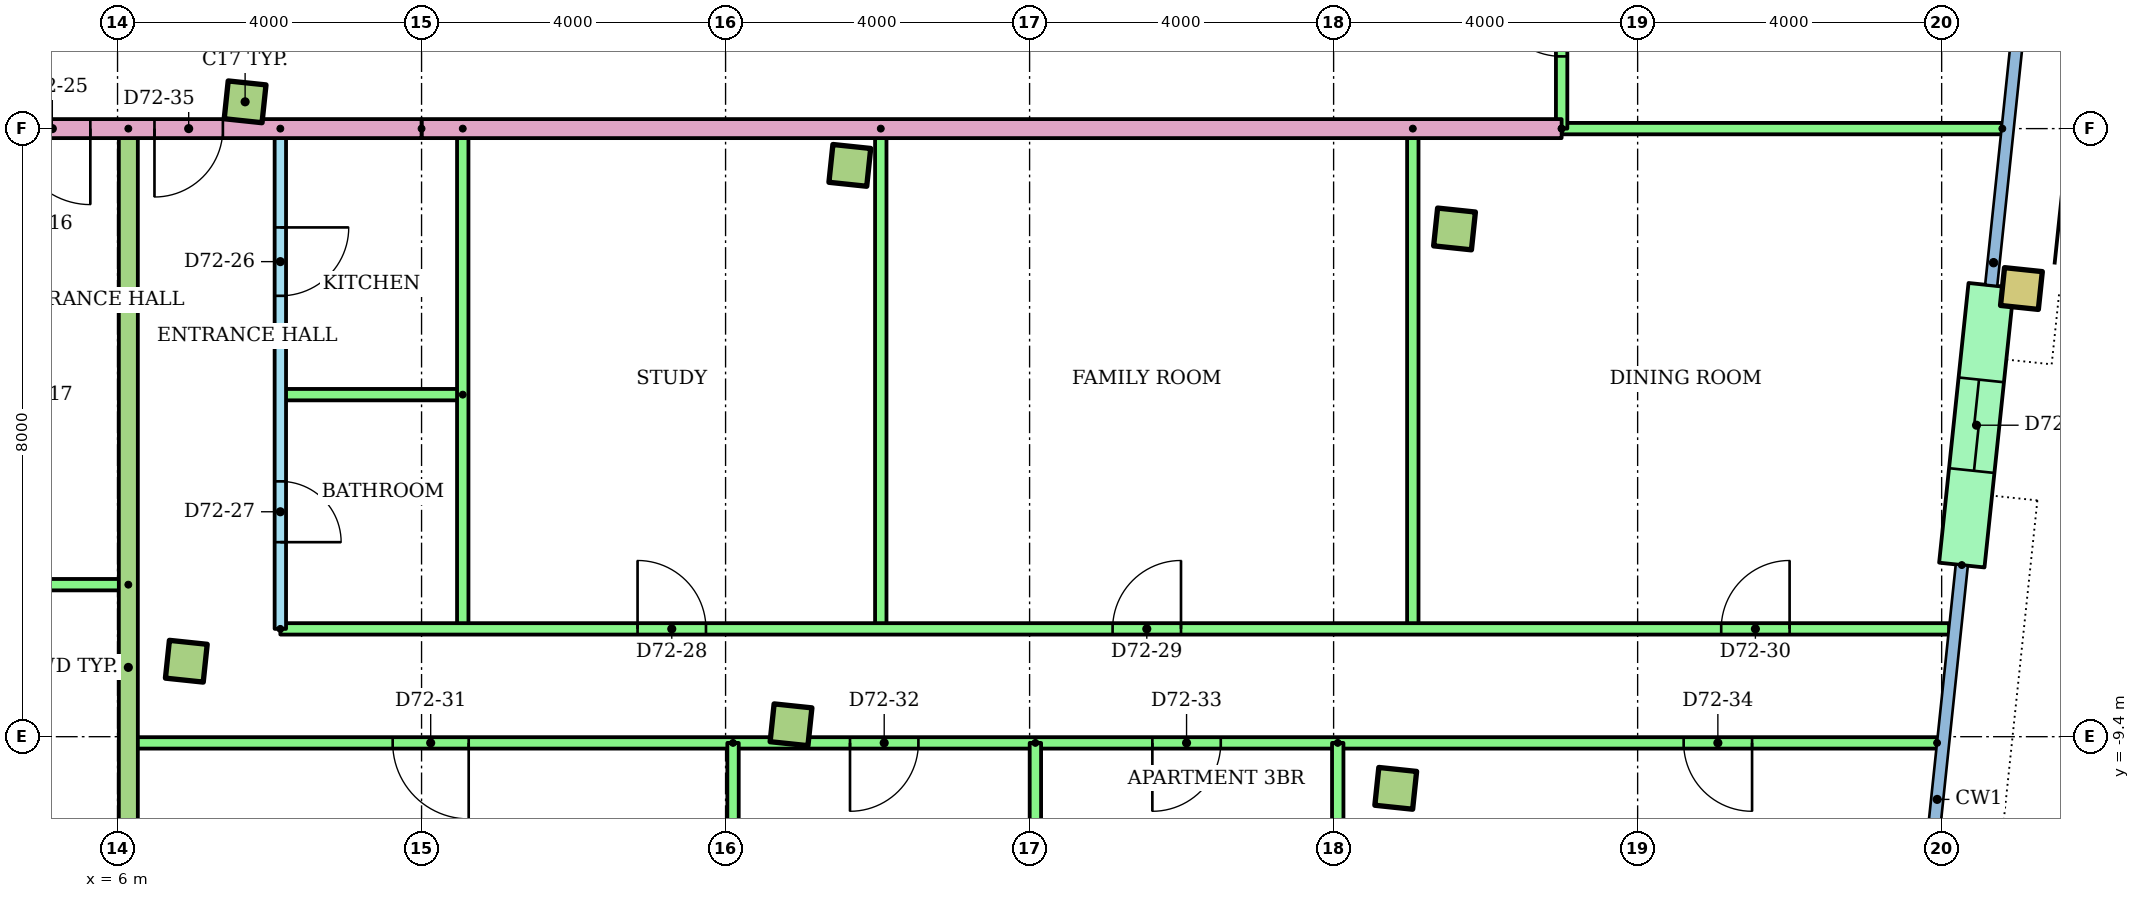
"""IFC4 building model, lengths in metres.
Left out: names, types, materials, properties, quantities, classifications, styles, units other than length and angle.
Written with IfcOpenShell. Run it as: python <this file> out.ifc"""

import sys

from ifc_helpers import new_model, si_unit, direction, frame, frame_2d, origin, origin_2d, place, context, subcontext, project, spatial, rectangle, hollow_rectangle, extrude, element, fill, save


model = new_model("IFC4")
c1 = context("Model", 3, precision=1e-05, world=origin(), true_north=direction((0.0, 1.0)))
c2 = subcontext(c1, "Body", "Model", "MODEL_VIEW")
j1 = project(units=[si_unit("LENGTHUNIT", "METRE"), si_unit("PLANEANGLEUNIT", "RADIAN")], contexts=[c1])
p1 = place(None, origin())
s1 = spatial("IfcSite", under=j1, at=p1, CompositionType="ELEMENT")
p2 = place(p1, origin())
s2 = spatial("IfcBuilding", under=s1, at=p2, CompositionType="ELEMENT")
p3 = place(p2, frame((0.0, 0.0, 275.5)))
s3 = spatial("IfcBuildingStorey", under=s2, at=p3, CompositionType="ELEMENT", Elevation=275.5)
for number, where, z_axis, x_axis in (
    (1, (6.905, -8.407, 0.0), (0.0, 0.0, 1.0), (0.995, -0.105, 0.0)),
    (2, (14.861, -9.243, 0.0), (0.0, 0.0, 1.0), (0.995, -0.105, 0.0)),
    (3, (22.817, -10.08, 0.0), (0.0, 0.0, 1.0), (0.995, -0.105, 0.0)),
    (4, (7.678, -1.048, 0.0), (0.0, 0.0, 1.0), (0.995, -0.105, 0.0)),
    (5, (15.635, -1.884, 0.0), (0.0, 0.0, 1.0), (0.995, -0.105, 0.0)),
    (6, (23.591, -2.72, 0.0), (0.0, 0.0, 1.0), (0.995, -0.105, 0.0)),
):
    element("IfcColumn", number, at=place(p3, frame(where, z_axis=z_axis, x_axis=x_axis)), inside=s3, PredefinedType="COLUMN", context=c2, shape_type="SweptSolid", body=[
        extrude(rectangle(XDim=0.5, YDim=0.5, at=origin_2d()), origin(), (0.0, 0.0, 1.0), 3.2),
    ])
p4 = place(p3, frame((31.05, -3.504, 0.0), z_axis=(0.0, 0.0, 1.0), x_axis=(0.994521895368, -0.104528463268, 0.0)))
e7 = element("IfcColumn", 7, at=p4, inside=s3, PredefinedType="COLUMN", context=c2, shape_type="SweptSolid", body=[
    extrude(hollow_rectangle(XDim=0.5, YDim=0.5, WallThickness=0.025, at=origin_2d()), origin(), (0.0, 0.0, 1.0), 3.2),
])
p5 = place(p3, frame((30.265, -7.142, 0.0), z_axis=(0.0, 0.0, 1.0), x_axis=(0.104513052986, 0.994523514933, 0.0)))
e8 = element("IfcWall", 8, at=p5, inside=s3, PredefinedType="STANDARD", context=c2, shape_type="SweptSolid", body=[
    extrude(rectangle(XDim=3.7, YDim=0.6, at=frame_2d((1.85, 0.0))), origin(), (0.0, 0.0, 1.0), 2.92),
])
p6 = place(p5, frame((1.25, 0.0, 0.0)))
e9 = element("IfcOpeningElement", 9, at=p6, cuts=e8, PredefinedType="OPENING", context=c2, shape_type="SweptSolid", body=[
    extrude(rectangle(XDim=1.2, YDim=2.1, at=frame_2d((0.6, 1.05))), frame((0.0, 0.31, 0.0), z_axis=(0.0, -1.0, 0.0), x_axis=(1.0, 0.0, 0.0)), (0.0, 0.0, 1.0), 0.62),
])
p7 = place(p3, frame((6.142, -7.4, 0.0), z_axis=(0.0, 0.0, 1.0), x_axis=(-1.0, 0.0, 0.0)))
e10 = element("IfcWall", 10, at=p7, inside=s3, PredefinedType="PARTITIONING", context=c2, shape_type="SweptSolid", body=[
    extrude(rectangle(XDim=15.912, YDim=0.15, at=frame_2d((7.956, 0.0))), origin(), (0.0, 0.0, 1.0), 2.4),
])
p8 = place(p7, frame((12.252, 0.0, 0.0)))
e11 = element("IfcOpeningElement", 11, at=p8, cuts=e10, PredefinedType="OPENING", context=c2, shape_type="SweptSolid", body=[
    extrude(rectangle(XDim=0.9, YDim=2.1, at=frame_2d((0.45, 1.05))), frame((0.0, 0.085, 0.0), z_axis=(0.0, -1.0, 0.0), x_axis=(1.0, 0.0, 0.0)), (0.0, 0.0, 1.0), 0.17),
])
p9 = place(p7, frame((9.495, 0.0, 0.0)))
e12 = element("IfcOpeningElement", 12, at=p9, cuts=e10, PredefinedType="OPENING", context=c2, shape_type="SweptSolid", body=[
    extrude(rectangle(XDim=0.9, YDim=2.1, at=frame_2d((0.45, 1.05))), frame((0.0, 0.085, 0.0), z_axis=(0.0, -1.0, 0.0), x_axis=(1.0, 0.0, 0.0)), (0.0, 0.0, 1.0), 0.17),
])
p10 = place(p7, frame((3.478, 0.0, 0.0)))
e13 = element("IfcOpeningElement", 13, at=p10, cuts=e10, PredefinedType="OPENING", context=c2, shape_type="SweptSolid", body=[
    extrude(rectangle(XDim=1.0, YDim=2.1, at=frame_2d((0.5, 1.05))), frame((0.0, 0.085, 0.0), z_axis=(0.0, -1.0, 0.0), x_axis=(1.0, 0.0, 0.0)), (0.0, 0.0, 1.0), 0.17),
])
p11 = place(p3, frame((8.142, -1.4, 0.0), z_axis=(0.0, 0.0, 1.0), x_axis=(0.0, -1.0, 0.0)))
e14 = element("IfcWall", 14, at=p11, inside=s3, PredefinedType="PARTITIONING", context=c2, shape_type="SweptSolid", body=[
    extrude(rectangle(XDim=6.582, YDim=0.15, at=frame_2d((3.291, 0.0))), origin(), (0.0, 0.0, 1.0), 2.4),
])
p12 = place(p11, frame((1.3, 0.0, 0.0)))
e15 = element("IfcOpeningElement", 15, at=p12, cuts=e14, PredefinedType="OPENING", context=c2, shape_type="SweptSolid", body=[
    extrude(rectangle(XDim=0.9, YDim=2.1, at=frame_2d((0.45, 1.05))), frame((0.0, 0.085, 0.0), z_axis=(0.0, -1.0, 0.0), x_axis=(1.0, 0.0, 0.0)), (0.0, 0.0, 1.0), 0.17),
])
p13 = place(p11, frame((4.641, 0.0, 0.0)))
e16 = element("IfcOpeningElement", 16, at=p13, cuts=e14, PredefinedType="OPENING", context=c2, shape_type="SweptSolid", body=[
    extrude(rectangle(XDim=0.8, YDim=2.1, at=frame_2d((0.4, 1.05))), frame((0.0, 0.085, 0.0), z_axis=(0.0, -1.0, 0.0), x_axis=(1.0, 0.0, 0.0)), (0.0, 0.0, 1.0), 0.17),
])
p14 = place(p3, frame((10.542, -4.9, 0.0), z_axis=(0.0, 0.0, 1.0), x_axis=(-1.0, 0.0, 0.0)))
e17 = element("IfcWall", 17, at=p14, inside=s3, PredefinedType="PARTITIONING", context=c2, shape_type="SweptSolid", body=[
    extrude(rectangle(XDim=2.4, YDim=0.15, at=frame_2d((1.2, 0.0))), origin(), (0.0, 0.0, 1.0), 2.4),
])
for number, where, z_axis, x_axis in (
    (18, (10.542, -1.4, 0.0), (0.0, 0.0, 1.0), (0.0, -1.0, 0.0)),
    (19, (16.042, -1.4, 0.0), (0.0, 0.0, 1.0), (0.0, -1.0, 0.0)),
    (20, (23.042, -1.4, 0.0), (0.0, 0.0, 1.0), (0.0, -1.0, 0.0)),
):
    element("IfcWall", number, at=place(p3, frame(where, z_axis=z_axis, x_axis=x_axis)), inside=s3, PredefinedType="PARTITIONING", context=c2, shape_type="SweptSolid", body=[
        extrude(rectangle(XDim=6.582, YDim=0.15, at=frame_2d((3.291, 0.0))), origin(), (0.0, 0.0, 1.0), 2.4),
    ])
p15 = place(p3, frame((8.142, -7.982, 0.0)))
e21 = element("IfcWall", 21, at=p15, inside=s3, PredefinedType="PARTITIONING", context=c2, shape_type="SweptSolid", body=[
    extrude(rectangle(XDim=21.955, YDim=0.15, at=frame_2d((10.978, 0.0))), origin(), (0.0, 0.0, 1.0), 2.4),
])
p16 = place(p15, frame((4.7, 0.0, 0.0)))
e22 = element("IfcOpeningElement", 22, at=p16, cuts=e21, PredefinedType="OPENING", context=c2, shape_type="SweptSolid", body=[
    extrude(rectangle(XDim=0.9, YDim=2.1, at=frame_2d((0.45, 1.05))), frame((0.0, 0.085, 0.0), z_axis=(0.0, -1.0, 0.0), x_axis=(1.0, 0.0, 0.0)), (0.0, 0.0, 1.0), 0.17),
])
p17 = place(p15, frame((10.95, 0.0, 0.0)))
e23 = element("IfcOpeningElement", 23, at=p17, cuts=e21, PredefinedType="OPENING", context=c2, shape_type="SweptSolid", body=[
    extrude(rectangle(XDim=0.9, YDim=2.1, at=frame_2d((0.45, 1.05))), frame((0.0, 0.085, 0.0), z_axis=(0.0, -1.0, 0.0), x_axis=(1.0, 0.0, 0.0)), (0.0, 0.0, 1.0), 0.17),
])
p18 = place(p15, frame((18.958, 0.0, 0.0)))
e24 = element("IfcOpeningElement", 24, at=p18, cuts=e21, PredefinedType="OPENING", context=c2, shape_type="SweptSolid", body=[
    extrude(rectangle(XDim=0.9, YDim=2.1, at=frame_2d((0.45, 1.05))), frame((0.0, 0.085, 0.0), z_axis=(0.0, -1.0, 0.0), x_axis=(1.0, 0.0, 0.0)), (0.0, 0.0, 1.0), 0.17),
])
p19 = place(p3, frame((29.94, -9.482, 0.0), z_axis=(0.0, 0.0, 1.0), x_axis=(-1.0, 0.0, 0.0)))
e25 = element("IfcWall", 25, at=p19, inside=s3, PredefinedType="PARTITIONING", context=c2, shape_type="SweptSolid", body=[
    extrude(rectangle(XDim=23.798, YDim=0.15, at=frame_2d((11.899, 0.0))), origin(), (0.0, 0.0, 1.0), 2.4),
])
p20 = place(p19, frame((19.32, 0.0, 0.0)))
e26 = element("IfcOpeningElement", 26, at=p20, cuts=e25, PredefinedType="OPENING", context=c2, shape_type="SweptSolid", body=[
    extrude(rectangle(XDim=1.0, YDim=2.1, at=frame_2d((0.5, 1.05))), frame((0.0, 0.085, 0.0), z_axis=(0.0, -1.0, 0.0), x_axis=(1.0, 0.0, 0.0)), (0.0, 0.0, 1.0), 0.17),
])
p21 = place(p19, frame((13.403, 0.0, 0.0)))
e27 = element("IfcOpeningElement", 27, at=p21, cuts=e25, PredefinedType="OPENING", context=c2, shape_type="SweptSolid", body=[
    extrude(rectangle(XDim=0.9, YDim=2.1, at=frame_2d((0.45, 1.05))), frame((0.0, 0.085, 0.0), z_axis=(0.0, -1.0, 0.0), x_axis=(1.0, 0.0, 0.0)), (0.0, 0.0, 1.0), 0.17),
])
p22 = place(p19, frame((9.425, 0.0, 0.0)))
e28 = element("IfcOpeningElement", 28, at=p22, cuts=e25, PredefinedType="OPENING", context=c2, shape_type="SweptSolid", body=[
    extrude(rectangle(XDim=0.9, YDim=2.1, at=frame_2d((0.45, 1.05))), frame((0.0, 0.085, 0.0), z_axis=(0.0, -1.0, 0.0), x_axis=(1.0, 0.0, 0.0)), (0.0, 0.0, 1.0), 0.17),
])
p23 = place(p19, frame((2.434, 0.0, 0.0)))
e29 = element("IfcOpeningElement", 29, at=p23, cuts=e25, PredefinedType="OPENING", context=c2, shape_type="SweptSolid", body=[
    extrude(rectangle(XDim=0.9, YDim=2.1, at=frame_2d((0.45, 1.05))), frame((0.0, 0.085, 0.0), z_axis=(0.0, -1.0, 0.0), x_axis=(1.0, 0.0, 0.0)), (0.0, 0.0, 1.0), 0.17),
])
p24 = place(p3, frame((14.098, -9.482, 0.0), z_axis=(0.0, 0.0, 1.0), x_axis=(0.0, -1.0, 0.0)))
e30 = element("IfcWall", 30, at=p24, inside=s3, PredefinedType="PARTITIONING", context=c2, shape_type="SweptSolid", body=[
    extrude(rectangle(XDim=6.931, YDim=0.15, at=frame_2d((3.466, 0.0))), origin(), (0.0, 0.0, 1.0), 2.4),
])
p25 = place(p3, frame((18.076, -9.482, 0.0), z_axis=(0.0, 0.0, 1.0), x_axis=(0.0, -1.0, 0.0)))
e31 = element("IfcWall", 31, at=p25, inside=s3, PredefinedType="PARTITIONING", context=c2, shape_type="SweptSolid", body=[
    extrude(rectangle(XDim=7.36, YDim=0.15, at=frame_2d((3.68, 0.0))), origin(), (0.0, 0.0, 1.0), 2.4),
])
p26 = place(p3, frame((22.054, -9.482, 0.0), z_axis=(0.0, 0.0, 1.0), x_axis=(0.0, -1.0, 0.0)))
e32 = element("IfcWall", 32, at=p26, inside=s3, PredefinedType="PARTITIONING", context=c2, shape_type="SweptSolid", body=[
    extrude(rectangle(XDim=7.767, YDim=0.15, at=frame_2d((3.884, 0.0))), origin(), (0.0, 0.0, 1.0), 2.4),
])
p27 = place(p3, frame((6.142, -1.4, 0.0), z_axis=(0.0, 0.0, 1.0), x_axis=(0.0, -1.0, 0.0)))
e33 = element("IfcWall", 33, at=p27, inside=s3, PredefinedType="PARTITIONING", context=c2, shape_type="SweptSolid", body=[
    extrude(rectangle(XDim=14.177, YDim=0.25, at=frame_2d((7.088, 0.0))), origin(), (0.0, 0.0, 1.0), 2.4),
])
p28 = place(p3, frame((25.0, -1.4, 0.0), z_axis=(0.0, 0.0, 1.0), x_axis=(-1.0, 0.0, 0.0)))
e34 = element("IfcWall", 34, at=p28, inside=s3, PredefinedType="PARTITIONING", context=c2, shape_type="SweptSolid", body=[
    extrude(rectangle(XDim=15.0, YDim=0.25, at=frame_2d((7.5, 0.0))), origin(), (0.0, 0.0, 1.0), 2.4),
])
p29 = place(p3, frame((30.798, -1.4, 0.0), z_axis=(0.0, 0.0, 1.0), x_axis=(-1.0, 0.0, 0.0)))
e35 = element("IfcWall", 35, at=p29, inside=s3, PredefinedType="PARTITIONING", context=c2, shape_type="SweptSolid", body=[
    extrude(rectangle(XDim=5.798, YDim=0.15, at=frame_2d((2.899, 0.0))), origin(), (0.0, 0.0, 1.0), 2.4),
])
p30 = place(p3, frame((25.0, -1.4, 0.0), z_axis=(0.0, 0.0, 1.0), x_axis=(0.0, 1.0, 0.0)))
e36 = element("IfcWall", 36, at=p30, inside=s3, PredefinedType="PARTITIONING", context=c2, shape_type="SweptSolid", body=[
    extrude(rectangle(XDim=2.8, YDim=0.15, at=frame_2d((1.4, 0.0))), origin(), (0.0, 0.0, 1.0), 2.4),
])
p31 = place(p30, frame((0.95, 0.0, 0.0)))
e37 = element("IfcOpeningElement", 37, at=p31, cuts=e36, PredefinedType="OPENING", context=c2, shape_type="SweptSolid", body=[
    extrude(rectangle(XDim=0.9, YDim=2.1, at=frame_2d((0.45, 1.05))), frame((0.0, 0.085, 0.0), z_axis=(0.0, -1.0, 0.0), x_axis=(1.0, 0.0, 0.0)), (0.0, 0.0, 1.0), 0.17),
])
p32 = place(p3, frame((10.0, -1.4, 0.0), z_axis=(0.0, 0.0, 1.0), x_axis=(-1.0, 0.0, 0.0)))
e38 = element("IfcWall", 38, at=p32, inside=s3, PredefinedType="PARTITIONING", context=c2, shape_type="SweptSolid", body=[
    extrude(rectangle(XDim=20.0, YDim=0.25, at=frame_2d((10.0, 0.0))), origin(), (0.0, 0.0, 1.0), 2.4),
])
p33 = place(p32, frame((4.358, 0.0, 0.0)))
e39 = element("IfcOpeningElement", 39, at=p33, cuts=e38, PredefinedType="OPENING", context=c2, shape_type="SweptSolid", body=[
    extrude(rectangle(XDim=1.0, YDim=2.1, at=frame_2d((0.5, 1.05))), frame((0.0, 0.135, 0.0), z_axis=(0.0, -1.0, 0.0), x_axis=(1.0, 0.0, 0.0)), (0.0, 0.0, 1.0), 0.27),
])
p34 = place(p32, frame((2.614, 0.0, 0.0)))
e40 = element("IfcOpeningElement", 40, at=p34, cuts=e38, PredefinedType="OPENING", context=c2, shape_type="SweptSolid", body=[
    extrude(rectangle(XDim=0.9, YDim=2.1, at=frame_2d((0.45, 1.05))), frame((0.0, 0.135, 0.0), z_axis=(0.0, -1.0, 0.0), x_axis=(1.0, 0.0, 0.0)), (0.0, 0.0, 1.0), 0.27),
])
p35 = place(p33, origin())
e41 = element("IfcDoor", 41, at=p35, inside=s3, OperationType="SINGLE_SWING_LEFT", PredefinedType="DOOR", context=c2, shape_type="SweptSolid", body=[
    extrude(rectangle(XDim=1.0, YDim=2.1, at=frame_2d((0.5, 1.05))), frame((0.0, 0.025, 0.0), z_axis=(0.0, -1.0, 0.0), x_axis=(1.0, 0.0, 0.0)), (0.0, 0.0, 1.0), 0.05),
])
fill(e39, e41)
p36 = place(p12, origin())
e42 = element("IfcDoor", 42, at=p36, inside=s3, OperationType="SINGLE_SWING_LEFT", PredefinedType="DOOR", context=c2, shape_type="SweptSolid", body=[
    extrude(rectangle(XDim=0.9, YDim=2.1, at=frame_2d((0.45, 1.05))), frame((0.0, 0.025, 0.0), z_axis=(0.0, -1.0, 0.0), x_axis=(1.0, 0.0, 0.0)), (0.0, 0.0, 1.0), 0.05),
])
fill(e15, e42)
p37 = place(p13, origin())
e43 = element("IfcDoor", 43, at=p37, inside=s3, OperationType="SINGLE_SWING_RIGHT", PredefinedType="DOOR", context=c2, shape_type="SweptSolid", body=[
    extrude(rectangle(XDim=0.8, YDim=2.1, at=frame_2d((0.4, 1.05))), frame((0.0, 0.025, 0.0), z_axis=(0.0, -1.0, 0.0), x_axis=(1.0, 0.0, 0.0)), (0.0, 0.0, 1.0), 0.05),
])
fill(e16, e43)
p38 = place(p16, origin())
e44 = element("IfcDoor", 44, at=p38, inside=s3, OperationType="SINGLE_SWING_LEFT", PredefinedType="DOOR", context=c2, shape_type="SweptSolid", body=[
    extrude(rectangle(XDim=0.9, YDim=2.1, at=frame_2d((0.45, 1.05))), frame((0.0, 0.025, 0.0), z_axis=(0.0, -1.0, 0.0), x_axis=(1.0, 0.0, 0.0)), (0.0, 0.0, 1.0), 0.05),
])
fill(e22, e44)
p39 = place(p17, origin())
e45 = element("IfcDoor", 45, at=p39, inside=s3, OperationType="SINGLE_SWING_RIGHT", PredefinedType="DOOR", context=c2, shape_type="SweptSolid", body=[
    extrude(rectangle(XDim=0.9, YDim=2.1, at=frame_2d((0.45, 1.05))), frame((0.0, 0.025, 0.0), z_axis=(0.0, -1.0, 0.0), x_axis=(1.0, 0.0, 0.0)), (0.0, 0.0, 1.0), 0.05),
])
fill(e23, e45)
p40 = place(p18, origin())
e46 = element("IfcDoor", 46, at=p40, inside=s3, OperationType="SINGLE_SWING_RIGHT", PredefinedType="DOOR", context=c2, shape_type="SweptSolid", body=[
    extrude(rectangle(XDim=0.9, YDim=2.1, at=frame_2d((0.45, 1.05))), frame((0.0, 0.025, 0.0), z_axis=(0.0, -1.0, 0.0), x_axis=(1.0, 0.0, 0.0)), (0.0, 0.0, 1.0), 0.05),
])
fill(e24, e46)
p41 = place(p20, origin())
e47 = element("IfcDoor", 47, at=p41, inside=s3, OperationType="SINGLE_SWING_LEFT", PredefinedType="DOOR", context=c2, shape_type="SweptSolid", body=[
    extrude(rectangle(XDim=1.0, YDim=2.1, at=frame_2d((0.5, 1.05))), frame((0.0, 0.025, 0.0), z_axis=(0.0, -1.0, 0.0), x_axis=(1.0, 0.0, 0.0)), (0.0, 0.0, 1.0), 0.05),
])
fill(e26, e47)
p42 = place(p21, origin())
e48 = element("IfcDoor", 48, at=p42, inside=s3, OperationType="SINGLE_SWING_RIGHT", PredefinedType="DOOR", context=c2, shape_type="SweptSolid", body=[
    extrude(rectangle(XDim=0.9, YDim=2.1, at=frame_2d((0.45, 1.05))), frame((0.0, 0.025, 0.0), z_axis=(0.0, -1.0, 0.0), x_axis=(1.0, 0.0, 0.0)), (0.0, 0.0, 1.0), 0.05),
])
fill(e27, e48)
p43 = place(p22, origin())
e49 = element("IfcDoor", 49, at=p43, inside=s3, OperationType="SINGLE_SWING_RIGHT", PredefinedType="DOOR", context=c2, shape_type="SweptSolid", body=[
    extrude(rectangle(XDim=0.9, YDim=2.1, at=frame_2d((0.45, 1.05))), frame((0.0, 0.025, 0.0), z_axis=(0.0, -1.0, 0.0), x_axis=(1.0, 0.0, 0.0)), (0.0, 0.0, 1.0), 0.05),
])
fill(e28, e49)
p44 = place(p23, origin())
e50 = element("IfcDoor", 50, at=p44, inside=s3, OperationType="SINGLE_SWING_LEFT", PredefinedType="DOOR", context=c2, shape_type="SweptSolid", body=[
    extrude(rectangle(XDim=0.9, YDim=2.1, at=frame_2d((0.45, 1.05))), frame((0.0, 0.025, 0.0), z_axis=(0.0, -1.0, 0.0), x_axis=(1.0, 0.0, 0.0)), (0.0, 0.0, 1.0), 0.05),
])
fill(e29, e50)
p45 = place(p34, origin())
e51 = element("IfcDoor", 51, at=p45, inside=s3, OperationType="SINGLE_SWING_RIGHT", PredefinedType="DOOR", context=c2, shape_type="SweptSolid", body=[
    extrude(rectangle(XDim=0.9, YDim=2.1, at=frame_2d((0.45, 1.05))), frame((0.0, 0.025, 0.0), z_axis=(0.0, -1.0, 0.0), x_axis=(1.0, 0.0, 0.0)), (0.0, 0.0, 1.0), 0.05),
])
fill(e40, e51)
p46 = place(p31, origin())
e52 = element("IfcDoor", 52, at=p46, inside=s3, OperationType="SINGLE_SWING_RIGHT", PredefinedType="DOOR", context=c2, shape_type="SweptSolid", body=[
    extrude(rectangle(XDim=0.9, YDim=2.1, at=frame_2d((0.45, 1.05))), frame((0.0, 0.025, 0.0), z_axis=(0.0, -1.0, 0.0), x_axis=(1.0, 0.0, 0.0)), (0.0, 0.0, 1.0), 0.05),
])
fill(e37, e52)
p47 = place(p6, origin())
e53 = element("IfcDoor", 53, at=p47, inside=s3, OperationType="SLIDING_TO_LEFT", PredefinedType="DOOR", context=c2, shape_type="SweptSolid", body=[
    extrude(rectangle(XDim=1.2, YDim=2.1, at=frame_2d((0.6, 1.05))), frame((0.0, 0.025, 0.0), z_axis=(0.0, -1.0, 0.0), x_axis=(1.0, 0.0, 0.0)), (0.0, 0.0, 1.0), 0.05),
])
fill(e9, e53)
save(model, sys.argv[1])
